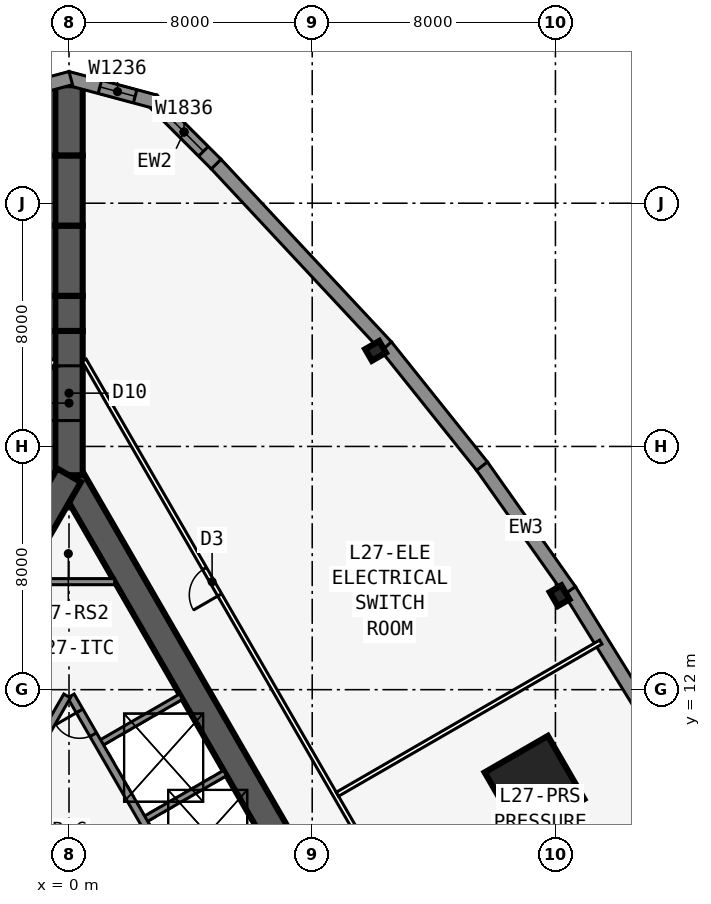
"""IFC4 building model, lengths in metres.
Left out: names, types, materials, properties, quantities, classifications, styles, units other than length and angle.
Written with IfcOpenShell. Run it as: python <this file> out.ifc"""

import sys

from ifc_helpers import new_model, si_unit, direction, frame, frame_2d, origin, origin_2d, place, context, subcontext, project, spatial, polyline, rectangle, i_section, outline, extrude, element, fill, save


model = new_model("IFC4")
c1 = context("Model", 3, precision=1e-05, world=origin(), true_north=direction((0.0, 1.0)))
c2 = subcontext(c1, "Body", "Model", "MODEL_VIEW")
j1 = project(units=[si_unit("LENGTHUNIT", "METRE"), si_unit("PLANEANGLEUNIT", "RADIAN")], contexts=[c1])
p1 = place(None, origin())
s1 = spatial("IfcSite", under=j1, at=p1, CompositionType="ELEMENT")
p2 = place(p1, origin())
s2 = spatial("IfcBuilding", under=s1, at=p2, CompositionType="ELEMENT")
p3 = place(p2, frame((0.0, 0.0, 103.3)))
s3 = spatial("IfcBuildingStorey", under=s2, at=p3, CompositionType="ELEMENT", Elevation=103.3)
p4 = place(p3, frame((16.5, -9.526, 0.0), z_axis=(0.0, 0.0, 1.0), x_axis=(-0.499999749417, 0.866025548458, 0.0)))
e1 = element("IfcWall", 1, at=p4, inside=s3, PredefinedType="SHEAR", context=c2, shape_type="SweptSolid", body=[
    extrude(rectangle(XDim=33.0, YDim=0.9, at=frame_2d((16.5, 0.0))), origin(), (0.0, 0.0, 1.0), 6.4),
])
p5 = place(p4, frame((14.15, 0.0, 0.0)))
e2 = element("IfcOpeningElement", 2, at=p5, cuts=e1, PredefinedType="OPENING", context=c2, shape_type="SweptSolid", body=[
    extrude(rectangle(XDim=1.8, YDim=2.13, at=frame_2d((0.9, 1.065))), frame((0.0, 0.46, 0.0), z_axis=(0.0, -1.0, 0.0), x_axis=(1.0, 0.0, 0.0)), (0.0, 0.0, 1.0), 0.92),
])
p6 = place(p4, frame((12.6, 0.0, 0.0)))
e3 = element("IfcOpeningElement", 3, at=p6, cuts=e1, PredefinedType="OPENING", context=c2, shape_type="SweptSolid", body=[
    extrude(rectangle(XDim=1.0, YDim=2.13, at=frame_2d((0.5, 1.065))), frame((0.0, 0.46, 0.0), z_axis=(0.0, -1.0, 0.0), x_axis=(1.0, 0.0, 0.0)), (0.0, 0.0, 1.0), 0.92),
])
p7 = place(p3, frame((5.379, 2.586, 0.0), z_axis=(0.0, 0.0, 1.0), x_axis=(-0.500001375892, 0.866024609411, 0.0)))
e4 = element("IfcWall", 4, at=p7, inside=s3, PredefinedType="SOLIDWALL", context=c2, shape_type="SweptSolid", body=[
    extrude(rectangle(XDim=10.633, YDim=0.25, at=frame_2d((5.316, 0.0))), origin(), (0.0, 0.0, 1.0), 6.15),
])
p8 = place(p7, frame((9.164, 0.0, 0.0)))
e5 = element("IfcOpeningElement", 5, at=p8, cuts=e4, PredefinedType="OPENING", context=c2, shape_type="SweptSolid", body=[
    extrude(rectangle(XDim=0.9, YDim=2.13, at=frame_2d((0.45, 1.065))), frame((0.0, 0.135, 0.0), z_axis=(0.0, -1.0, 0.0), x_axis=(1.0, 0.0, 0.0)), (0.0, 0.0, 1.0), 0.27),
])
for number, where, z_axis, x_axis in (
    (6, (2.429, 7.696, 0.0), (0.0, 0.0, 1.0), (0.866, 0.5, 0.0)),
    (7, (0.979, 10.207, 0.0), (0.0, 0.0, 1.0), (0.866, 0.5, 0.0)),
):
    element("IfcWall", number, at=place(p3, frame(where, z_axis=z_axis, x_axis=x_axis)), inside=s3, PredefinedType="SOLIDWALL", context=c2, shape_type="SweptSolid", body=[
        extrude(rectangle(XDim=3.125, YDim=0.2, at=frame_2d((1.562, 0.0))), origin(), (0.0, 0.0, 1.0), 6.15),
    ])
p9 = place(p3, frame((0.0, 19.052, 0.0), z_axis=(0.0, 0.0, 1.0), x_axis=(-0.499999749417, -0.866025548458, 0.0)))
e8 = element("IfcWall", 8, at=p9, inside=s3, PredefinedType="SHEAR", context=c2, shape_type="SweptSolid", body=[
    extrude(rectangle(XDim=33.0, YDim=0.9, at=frame_2d((16.5, 0.0))), origin(), (0.0, 0.0, 1.0), 6.4),
])
p10 = place(p9, frame((14.15, 0.0, 0.0)))
e9 = element("IfcOpeningElement", 9, at=p10, cuts=e8, PredefinedType="OPENING", context=c2, shape_type="SweptSolid", body=[
    extrude(rectangle(XDim=1.8, YDim=2.13, at=frame_2d((0.9, 1.065))), frame((0.0, 0.46, 0.0), z_axis=(0.0, -1.0, 0.0), x_axis=(1.0, 0.0, 0.0)), (0.0, 0.0, 1.0), 0.92),
])
p11 = place(p9, frame((12.6, 0.0, 0.0)))
e10 = element("IfcOpeningElement", 10, at=p11, cuts=e8, PredefinedType="OPENING", context=c2, shape_type="SweptSolid", body=[
    extrude(rectangle(XDim=1.0, YDim=2.13, at=frame_2d((0.5, 1.065))), frame((0.0, 0.46, 0.0), z_axis=(0.0, -1.0, 0.0), x_axis=(1.0, 0.0, 0.0)), (0.0, 0.0, 1.0), 0.92),
])
p12 = place(p3, frame((-0.062, 11.794, 0.0), z_axis=(0.0, 0.0, 1.0), x_axis=(-0.500006680225, -0.86602154692, 0.0)))
e11 = element("IfcWall", 11, at=p12, inside=s3, PredefinedType="SOLIDWALL", context=c2, shape_type="SweptSolid", body=[
    extrude(rectangle(XDim=7.733, YDim=0.25, at=frame_2d((3.866, 0.0))), origin(), (0.0, 0.0, 1.0), 6.15),
])
p13 = place(p3, frame((0.0, 19.052, 0.0), z_axis=(0.0, 0.0, 1.0), x_axis=(0.0, 1.0, 0.0)))
e12 = element("IfcWall", 12, at=p13, inside=s3, PredefinedType="SHEAR", context=c2, shape_type="SweptSolid", body=[
    extrude(rectangle(XDim=4.746, YDim=0.9, at=frame_2d((2.373, 0.0))), origin(), (0.0, 0.0, 1.0), 6.4),
])
p14 = place(p13, frame((1.8, 0.0, 0.0)))
e13 = element("IfcOpeningElement", 13, at=p14, cuts=e12, PredefinedType="OPENING", context=c2, shape_type="SweptSolid", body=[
    extrude(rectangle(XDim=1.8, YDim=2.13, at=frame_2d((0.9, 1.065))), frame((0.0, 0.46, 0.0), z_axis=(0.0, -1.0, 0.0), x_axis=(1.0, 0.0, 0.0)), (0.0, 0.0, 1.0), 0.92),
])
p15 = place(p3, frame((0.0, 23.799, 0.0), z_axis=(0.0, 0.0, 1.0), x_axis=(0.0, 1.0, 0.0)))
e14 = element("IfcWall", 14, at=p15, inside=s3, PredefinedType="SHEAR", context=c2, shape_type="SweptSolid", body=[
    extrude(rectangle(XDim=1.155, YDim=0.9, at=frame_2d((0.577, 0.0))), origin(), (0.0, 0.0, 1.0), 6.4),
])
p16 = place(p3, frame((0.0, 24.953, 0.0), z_axis=(0.0, 0.0, 1.0), x_axis=(0.0, 1.0, 0.0)))
e15 = element("IfcWall", 15, at=p16, inside=s3, PredefinedType="SHEAR", context=c2, shape_type="SweptSolid", body=[
    extrude(rectangle(XDim=2.309, YDim=0.9, at=frame_2d((1.155, 0.0))), origin(), (0.0, 0.0, 1.0), 6.4),
])
p17 = place(p3, frame((0.0, 27.263, 0.0), z_axis=(0.0, 0.0, 1.0), x_axis=(0.0, 1.0, 0.0)))
e16 = element("IfcWall", 16, at=p17, inside=s3, PredefinedType="SHEAR", context=c2, shape_type="SweptSolid", body=[
    extrude(rectangle(XDim=2.31, YDim=0.9, at=frame_2d((1.155, 0.0))), origin(), (0.0, 0.0, 1.0), 6.4),
])
p18 = place(p3, frame((0.0, 29.572, 0.0), z_axis=(0.0, 0.0, 1.0), x_axis=(0.0, 1.0, 0.0)))
e17 = element("IfcWall", 17, at=p18, inside=s3, PredefinedType="SHEAR", context=c2, shape_type="SweptSolid", body=[
    extrude(rectangle(XDim=2.309, YDim=0.9, at=frame_2d((1.155, 0.0))), origin(), (0.0, 0.0, 1.0), 6.4),
])
for number, where, z_axis, x_axis in (
    (18, (16.137, 15.09, 0.0), (0.0, 0.0, 1.0), (0.866, 0.5, 0.0)),
    (19, (10.083, 23.142, 0.0), (0.0, 0.0, 1.0), (-0.5, 0.866, 0.0)),
):
    element("IfcColumn", number, at=place(p3, frame(where, z_axis=z_axis, x_axis=x_axis)), inside=s3, PredefinedType="COLUMN", context=c2, shape_type="SweptSolid", body=[
        extrude(i_section(OverallWidth=0.442, OverallDepth=0.531, WebThickness=0.066, FlangeThickness=0.106, at=origin_2d()), origin(), (0.0, 0.0, 1.0), 6.4),
    ])
p19 = place(p3, frame((15.312, 8.84, 0.0), z_axis=(0.0, 0.0, 1.0), x_axis=(0.866025403784, 0.5, 0.0)))
e20 = element("IfcColumn", 20, at=p19, inside=s3, PredefinedType="COLUMN", context=c2, shape_type="SweptSolid", body=[
    extrude(rectangle(XDim=2.4, YDim=2.4, at=origin_2d()), origin(), (0.0, 0.0, 1.0), 6.4),
])
p20 = place(p3, frame((19.097, 11.018, 0.0), z_axis=(0.0, 0.0, 1.0), x_axis=(-0.52611097126, 0.850415925251, 0.0)))
e21 = element("IfcWall", 21, at=p20, inside=s3, PredefinedType="SOLIDWALL", context=c2, shape_type="SweptSolid", body=[
    extrude(outline(polyline([(0.0, 0.0), (5.002, 0.0), (5.002, 6.15), (0.0, 6.15), (0.0, 0.0)]), holes=[polyline([(4.401, 3.075), (4.336, 3.567), (4.146, 4.025), (3.844, 4.418), (3.451, 4.72), (2.993, 4.91), (2.501, 4.975), (2.01, 4.91), (1.551, 4.72), (1.158, 4.418), (0.856, 4.025), (0.666, 3.567), (0.601, 3.075), (0.666, 2.583), (0.856, 2.125), (1.158, 1.731), (1.551, 1.429), (2.01, 1.24), (2.501, 1.175), (2.993, 1.24), (3.451, 1.429), (3.844, 1.731), (4.146, 2.125), (4.336, 2.583), (4.401, 3.075)])]), frame((0.0, 0.225, 0.0), z_axis=(0.0, -1.0, 0.0), x_axis=(1.0, 0.0, 0.0)), (0.0, 0.0, 1.0), 0.45),
])
p21 = place(p3, frame((16.473, 15.26, 0.0), z_axis=(0.0, 0.0, 1.0), x_axis=(-0.5766431066, 0.81699616132, 0.0)))
e22 = element("IfcWall", 22, at=p21, inside=s3, PredefinedType="SOLIDWALL", context=c2, shape_type="SweptSolid", body=[
    extrude(outline(polyline([(0.0, 0.0), (5.021, 0.0), (5.021, 6.15), (0.0, 6.15), (0.0, 0.0)]), holes=[polyline([(4.41, 3.075), (4.346, 3.567), (4.156, 4.025), (3.854, 4.418), (3.46, 4.72), (3.002, 4.91), (2.51, 4.975), (2.019, 4.91), (1.56, 4.72), (1.167, 4.418), (0.865, 4.025), (0.675, 3.567), (0.61, 3.075), (0.675, 2.583), (0.865, 2.125), (1.167, 1.731), (1.56, 1.429), (2.019, 1.24), (2.51, 1.175), (3.002, 1.24), (3.46, 1.429), (3.854, 1.731), (4.156, 2.125), (4.346, 2.583), (4.41, 3.075)])]), frame((0.0, 0.225, 0.0), z_axis=(0.0, -1.0, 0.0), x_axis=(1.0, 0.0, 0.0)), (0.0, 0.0, 1.0), 0.45),
])
p22 = place(p3, frame((13.586, 19.352, 0.0), z_axis=(0.0, 0.0, 1.0), x_axis=(-0.624594965756, 0.780948864364, 0.0)))
e23 = element("IfcWall", 23, at=p22, inside=s3, PredefinedType="SOLIDWALL", context=c2, shape_type="SweptSolid", body=[
    extrude(outline(polyline([(0.0, 0.0), (5.058, 0.0), (5.058, 6.15), (0.0, 6.15), (0.0, 0.0)]), holes=[polyline([(4.429, 3.075), (4.364, 3.567), (4.174, 4.025), (3.872, 4.418), (3.479, 4.72), (3.021, 4.91), (2.529, 4.975), (2.037, 4.91), (1.579, 4.72), (1.185, 4.418), (0.883, 4.025), (0.694, 3.567), (0.629, 3.075), (0.694, 2.583), (0.883, 2.125), (1.185, 1.731), (1.579, 1.429), (2.037, 1.24), (2.529, 1.175), (3.021, 1.24), (3.479, 1.429), (3.872, 1.731), (4.174, 2.125), (4.364, 2.583), (4.429, 3.075)])]), frame((0.0, 0.225, 0.0), z_axis=(0.0, -1.0, 0.0), x_axis=(1.0, 0.0, 0.0)), (0.0, 0.0, 1.0), 0.45),
])
p23 = place(p3, frame((10.438, 23.288, 0.0), z_axis=(0.0, 0.0, 1.0), x_axis=(-0.682290707137, 0.73108097428, 0.0)))
e24 = element("IfcWall", 24, at=p23, inside=s3, PredefinedType="SOLIDWALL", context=c2, shape_type="SweptSolid", body=[
    extrude(outline(polyline([(0.0, 0.0), (8.211, 0.0), (8.211, 6.15), (0.0, 6.15), (0.0, 0.0)]), holes=[polyline([(6.556, 3.075), (6.472, 3.709), (6.227, 4.3), (5.838, 4.807), (5.331, 5.197), (4.74, 5.441), (4.106, 5.525), (3.471, 5.441), (2.881, 5.197), (2.373, 4.807), (1.984, 4.3), (1.739, 3.709), (1.656, 3.075), (1.739, 2.441), (1.984, 1.85), (2.373, 1.343), (2.881, 0.953), (3.471, 0.708), (4.106, 0.625), (4.74, 0.708), (5.331, 0.953), (5.838, 1.343), (6.227, 1.85), (6.472, 2.441), (6.556, 3.075)])]), frame((0.0, 0.225, 0.0), z_axis=(0.0, -1.0, 0.0), x_axis=(1.0, 0.0, 0.0)), (0.0, 0.0, 1.0), 0.45),
])
p24 = place(p3, frame((4.841, 29.286, 0.0), z_axis=(0.0, 0.0, 1.0), x_axis=(-0.707106781187, 0.707106781187, 0.0)))
e25 = element("IfcWall", 25, at=p24, inside=s3, PredefinedType="SOLIDWALL", context=c2, shape_type="SweptSolid", body=[
    extrude(rectangle(XDim=2.988, YDim=0.45, at=frame_2d((1.494, 0.0))), origin(), (0.0, 0.0, 1.0), 6.15),
])
p25 = place(p24, frame((0.594, 0.0, 1.2)))
e26 = element("IfcOpeningElement", 26, at=p25, cuts=e25, PredefinedType="OPENING", context=c2, shape_type="SweptSolid", body=[
    extrude(rectangle(XDim=1.8, YDim=3.6, at=frame_2d((0.9, 1.8))), frame((0.0, 0.235, 0.0), z_axis=(0.0, -1.0, 0.0), x_axis=(1.0, 0.0, 0.0)), (0.0, 0.0, 1.0), 0.47),
])
p26 = place(p3, frame((2.829, 31.341, 0.0), z_axis=(0.0, 0.0, 1.0), x_axis=(-0.965930548995, 0.258801419081, 0.0)))
e27 = element("IfcWall", 27, at=p26, inside=s3, PredefinedType="SOLIDWALL", context=c2, shape_type="SweptSolid", body=[
    extrude(outline(polyline([(2.989, 0.225), (2.929, 0.225), (2.438, 0.093), (2.402, 0.225), (0.0, 0.225), (0.0, -0.225), (2.989, -0.225), (2.989, 0.225)])), origin(), (0.0, 0.0, 1.0), 6.15),
])
p27 = place(p26, frame((0.676, 0.0, 1.2)))
e28 = element("IfcOpeningElement", 28, at=p27, cuts=e27, PredefinedType="OPENING", context=c2, shape_type="SweptSolid", body=[
    extrude(rectangle(XDim=1.2, YDim=3.6, at=frame_2d((0.6, 1.8))), frame((0.0, 0.235, 0.0), z_axis=(0.0, -1.0, 0.0), x_axis=(1.0, 0.0, 0.0)), (0.0, 0.0, 1.0), 0.47),
])
p28 = place(p3, frame((0.058, 32.114, 0.0), z_axis=(0.0, 0.0, 1.0), x_axis=(-0.965930548995, -0.258801419081, 0.0)))
e29 = element("IfcWall", 29, at=p28, inside=s3, PredefinedType="SOLIDWALL", context=c2, shape_type="SweptSolid", body=[
    extrude(outline(polyline([(2.989, 0.225), (0.586, 0.225), (0.551, 0.093), (0.059, 0.225), (0.0, 0.225), (0.0, -0.225), (2.989, -0.225), (2.989, 0.225)])), origin(), (0.0, 0.0, 1.0), 6.15),
])
p29 = place(p28, frame((1.113, 0.0, 1.2)))
e30 = element("IfcOpeningElement", 30, at=p29, cuts=e29, PredefinedType="OPENING", context=c2, shape_type="SweptSolid", body=[
    extrude(rectangle(XDim=1.2, YDim=3.6, at=frame_2d((0.6, 1.8))), frame((0.0, 0.235, 0.0), z_axis=(0.0, -1.0, 0.0), x_axis=(1.0, 0.0, 0.0)), (0.0, 0.0, 1.0), 0.47),
])
p30 = place(p3, frame((20.027, -10.985, 0.0), z_axis=(0.0, 0.0, 1.0), x_axis=(-0.500001677587, 0.866024435227, 0.0)))
e31 = element("IfcWall", 31, at=p30, inside=s3, PredefinedType="PARTITIONING", context=c2, shape_type="SweptSolid", body=[
    extrude(rectangle(XDim=39.054, YDim=0.15, at=frame_2d((19.527, 0.0))), origin(), (0.0, 0.0, 1.0), 6.15),
])
p31 = place(p30, frame((6.414, 0.0, 0.0)))
e32 = element("IfcOpeningElement", 32, at=p31, cuts=e31, PredefinedType="OPENING", context=c2, shape_type="SweptSolid", body=[
    extrude(rectangle(XDim=1.0, YDim=2.13, at=frame_2d((0.5, 1.065))), frame((0.0, 0.085, 0.0), z_axis=(0.0, -1.0, 0.0), x_axis=(1.0, 0.0, 0.0)), (0.0, 0.0, 1.0), 0.17),
])
p32 = place(p30, frame((17.527, 0.0, 0.0)))
e33 = element("IfcOpeningElement", 33, at=p32, cuts=e31, PredefinedType="OPENING", context=c2, shape_type="SweptSolid", body=[
    extrude(rectangle(XDim=1.0, YDim=2.13, at=frame_2d((0.5, 1.065))), frame((0.0, 0.085, 0.0), z_axis=(0.0, -1.0, 0.0), x_axis=(1.0, 0.0, 0.0)), (0.0, 0.0, 1.0), 0.17),
])
p33 = place(p30, frame((30.14, 0.0, 0.0)))
e34 = element("IfcOpeningElement", 34, at=p33, cuts=e31, PredefinedType="OPENING", context=c2, shape_type="SweptSolid", body=[
    extrude(rectangle(XDim=1.0, YDim=2.13, at=frame_2d((0.5, 1.065))), frame((0.0, 0.085, 0.0), z_axis=(0.0, -1.0, 0.0), x_axis=(1.0, 0.0, 0.0)), (0.0, 0.0, 1.0), 0.17),
])
p34 = place(p3, frame((8.829, 8.561, 0.0), z_axis=(0.0, 0.0, 1.0), x_axis=(0.86602100491, 0.500007618997, 0.0)))
e35 = element("IfcWall", 35, at=p34, inside=s3, PredefinedType="PARTITIONING", context=c2, shape_type="SweptSolid", body=[
    extrude(rectangle(XDim=10.005, YDim=0.15, at=frame_2d((5.002, 0.0))), origin(), (0.0, 0.0, 1.0), 6.15),
])
p35 = place(p3, frame((-0.5, 22.836, 0.0), z_axis=(0.0, 0.0, 1.0), x_axis=(-0.500001677587, -0.866024435227, 0.0)))
e36 = element("IfcWall", 36, at=p35, inside=s3, PredefinedType="PARTITIONING", context=c2, shape_type="SweptSolid", body=[
    extrude(rectangle(XDim=39.054, YDim=0.15, at=frame_2d((19.527, 0.0))), origin(), (0.0, 0.0, 1.0), 6.15),
])
p36 = place(p35, frame((9.414, 0.0, 0.0)))
e37 = element("IfcOpeningElement", 37, at=p36, cuts=e36, PredefinedType="OPENING", context=c2, shape_type="SweptSolid", body=[
    extrude(rectangle(XDim=1.0, YDim=2.13, at=frame_2d((0.5, 1.065))), frame((0.0, 0.085, 0.0), z_axis=(0.0, -1.0, 0.0), x_axis=(1.0, 0.0, 0.0)), (0.0, 0.0, 1.0), 0.17),
])
p37 = place(p35, frame((21.527, 0.0, 0.0)))
e38 = element("IfcOpeningElement", 38, at=p37, cuts=e36, PredefinedType="OPENING", context=c2, shape_type="SweptSolid", body=[
    extrude(rectangle(XDim=1.0, YDim=2.13, at=frame_2d((0.5, 1.065))), frame((0.0, 0.085, 0.0), z_axis=(0.0, -1.0, 0.0), x_axis=(1.0, 0.0, 0.0)), (0.0, 0.0, 1.0), 0.17),
])
p38 = place(p35, frame((31.14, 0.0, 0.0)))
e39 = element("IfcOpeningElement", 39, at=p38, cuts=e36, PredefinedType="OPENING", context=c2, shape_type="SweptSolid", body=[
    extrude(rectangle(XDim=1.0, YDim=2.13, at=frame_2d((0.5, 1.065))), frame((0.0, 0.085, 0.0), z_axis=(0.0, -1.0, 0.0), x_axis=(1.0, 0.0, 0.0)), (0.0, 0.0, 1.0), 0.17),
])
p39 = place(p3, frame((-1.501, 15.552, 0.0), z_axis=(0.0, 0.0, 1.0), x_axis=(1.0, 0.0, 0.0)))
e40 = element("IfcWall", 40, at=p39, inside=s3, PredefinedType="SOLIDWALL", context=c2, shape_type="SweptSolid", body=[
    extrude(rectangle(XDim=3.002, YDim=0.2, at=frame_2d((1.501, 0.0))), origin(), (0.0, 0.0, 1.0), 6.15),
])
p40 = place(p25, origin())
e41 = element("IfcWindow", 41, at=p40, inside=s3, PartitioningType="SINGLE_PANEL", PredefinedType="WINDOW", context=c2, shape_type="SweptSolid", body=[
    extrude(rectangle(XDim=1.8, YDim=3.6, at=frame_2d((0.9, 1.8))), frame((0.0, 0.03, 0.0), z_axis=(0.0, -1.0, 0.0), x_axis=(1.0, 0.0, 0.0)), (0.0, 0.0, 1.0), 0.06),
])
fill(e26, e41)
p41 = place(p27, origin())
e42 = element("IfcWindow", 42, at=p41, inside=s3, PartitioningType="SINGLE_PANEL", PredefinedType="WINDOW", context=c2, shape_type="SweptSolid", body=[
    extrude(rectangle(XDim=1.2, YDim=3.6, at=frame_2d((0.6, 1.8))), frame((0.0, 0.03, 0.0), z_axis=(0.0, -1.0, 0.0), x_axis=(1.0, 0.0, 0.0)), (0.0, 0.0, 1.0), 0.06),
])
fill(e28, e42)
p42 = place(p33, origin())
e43 = element("IfcDoor", 43, at=p42, inside=s3, OperationType="SINGLE_SWING_LEFT", PredefinedType="DOOR", context=c2, shape_type="SweptSolid", body=[
    extrude(rectangle(XDim=1.0, YDim=2.13, at=frame_2d((0.5, 1.065))), frame((0.0, 0.025, 0.0), z_axis=(0.0, -1.0, 0.0), x_axis=(1.0, 0.0, 0.0)), (0.0, 0.0, 1.0), 0.05),
])
fill(e34, e43)
p43 = place(p14, origin())
e44 = element("IfcDoor", 44, at=p43, inside=s3, OperationType="DOUBLE_DOOR_DOUBLE_SWING", PredefinedType="DOOR", context=c2, shape_type="SweptSolid", body=[
    extrude(rectangle(XDim=1.8, YDim=2.13, at=frame_2d((0.9, 1.065))), frame((0.0, 0.025, 0.0), z_axis=(0.0, -1.0, 0.0), x_axis=(1.0, 0.0, 0.0)), (0.0, 0.0, 1.0), 0.05),
])
fill(e13, e44)
p44 = place(p8, origin())
e45 = element("IfcDoor", 45, at=p44, inside=s3, OperationType="SINGLE_SWING_RIGHT", PredefinedType="DOOR", context=c2, shape_type="SweptSolid", body=[
    extrude(rectangle(XDim=0.9, YDim=2.13, at=frame_2d((0.45, 1.065))), frame((0.0, 0.025, 0.0), z_axis=(0.0, -1.0, 0.0), x_axis=(1.0, 0.0, 0.0)), (0.0, 0.0, 1.0), 0.05),
])
fill(e5, e45)
save(model, sys.argv[1])
